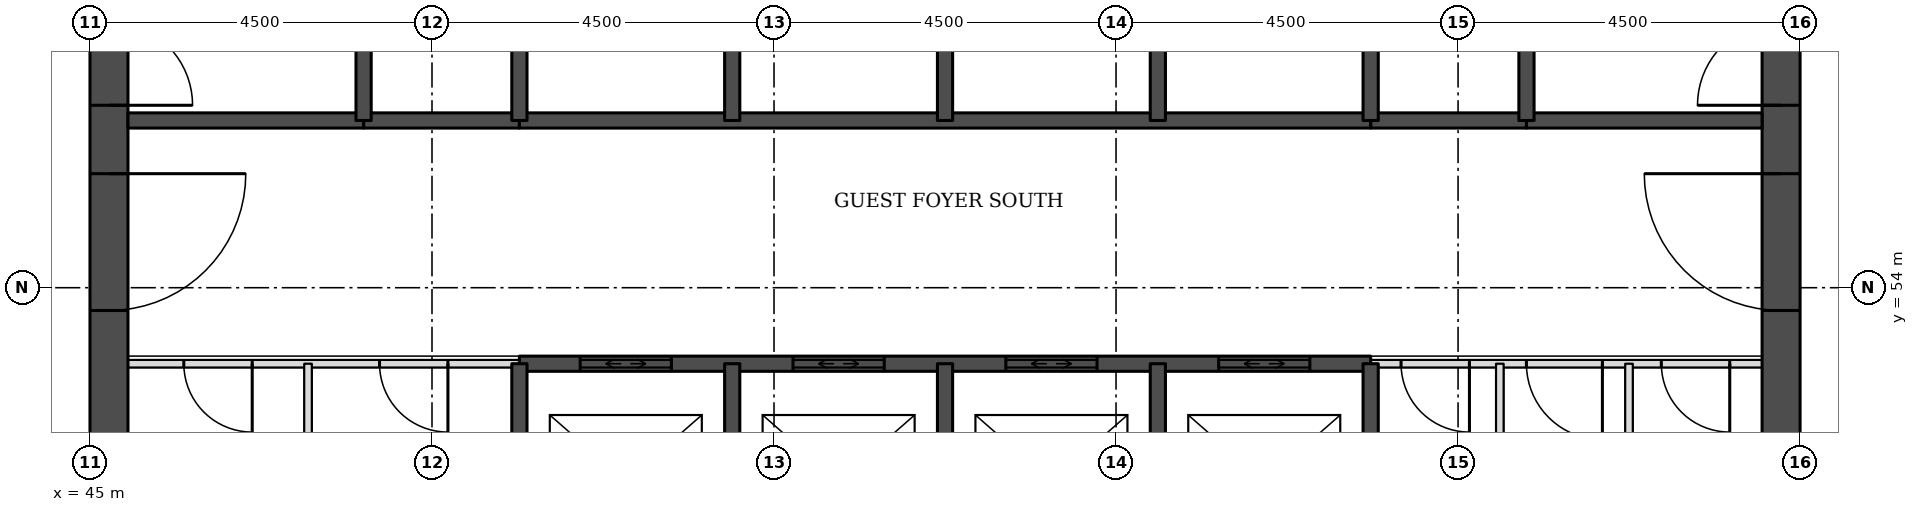
"""IFC4 building model, lengths in metres.
Left out: names, types, materials, properties, quantities, classifications, styles, units other than length and angle.
Written with IfcOpenShell. Run it as: python <this file> out.ifc"""

import sys

from ifc_helpers import new_model, si_unit, direction, frame, frame_2d, origin, place, context, subcontext, project, spatial, rectangle, extrude, element, fill, save


model = new_model("IFC4")
c1 = context("Model", 3, precision=1e-05, world=origin(), true_north=direction((0.0, 1.0)))
c2 = subcontext(c1, "Body", "Model", "MODEL_VIEW")
j1 = project(units=[si_unit("LENGTHUNIT", "METRE"), si_unit("PLANEANGLEUNIT", "RADIAN")], contexts=[c1])
p1 = place(None, origin())
s1 = spatial("IfcSite", under=j1, at=p1, CompositionType="ELEMENT")
p2 = place(p1, origin())
s2 = spatial("IfcBuilding", under=s1, at=p2, CompositionType="ELEMENT")
p3 = place(p2, frame((0.0, 0.0, 26.4)))
s3 = spatial("IfcBuildingStorey", under=s2, at=p3, CompositionType="ELEMENT", Elevation=26.4)
p4 = place(p3, frame((45.25, 49.5, 0.0), z_axis=(0.0, 0.0, 1.0), x_axis=(0.0, 1.0, 0.0)))
e1 = element("IfcWall", 1, at=p4, inside=s3, PredefinedType="SHEAR", context=c2, shape_type="SweptSolid", body=[
    extrude(rectangle(XDim=22.5, YDim=0.5, at=frame_2d((11.25, 0.0))), origin(), (0.0, 0.0, 1.0), 3.3),
])
p5 = place(p4, frame((4.2, 0.0, 0.0)))
e2 = element("IfcOpeningElement", 2, at=p5, cuts=e1, PredefinedType="OPENING", context=c2, shape_type="SweptSolid", body=[
    extrude(rectangle(XDim=1.8, YDim=2.1, at=frame_2d((0.9, 1.05))), frame((0.0, 0.26, 0.0), z_axis=(0.0, -1.0, 0.0), x_axis=(1.0, 0.0, 0.0)), (0.0, 0.0, 1.0), 0.52),
])
p6 = place(p4, frame((6.9, 0.0, 0.0)))
e3 = element("IfcOpeningElement", 3, at=p6, cuts=e1, PredefinedType="OPENING", context=c2, shape_type="SweptSolid", body=[
    extrude(rectangle(XDim=1.1, YDim=2.1, at=frame_2d((0.55, 1.05))), frame((0.0, 0.26, 0.0), z_axis=(0.0, -1.0, 0.0), x_axis=(1.0, 0.0, 0.0)), (0.0, 0.0, 1.0), 0.52),
])
p7 = place(p4, frame((13.6, 0.0, 0.0)))
e4 = element("IfcOpeningElement", 4, at=p7, cuts=e1, PredefinedType="OPENING", context=c2, shape_type="SweptSolid", body=[
    extrude(rectangle(XDim=1.1, YDim=2.1, at=frame_2d((0.55, 1.05))), frame((0.0, 0.26, 0.0), z_axis=(0.0, -1.0, 0.0), x_axis=(1.0, 0.0, 0.0)), (0.0, 0.0, 1.0), 0.52),
])
p8 = place(p4, frame((16.5, 0.0, 0.0)))
e5 = element("IfcOpeningElement", 5, at=p8, cuts=e1, PredefinedType="OPENING", context=c2, shape_type="SweptSolid", body=[
    extrude(rectangle(XDim=1.8, YDim=2.1, at=frame_2d((0.9, 1.05))), frame((0.0, 0.26, 0.0), z_axis=(0.0, -1.0, 0.0), x_axis=(1.0, 0.0, 0.0)), (0.0, 0.0, 1.0), 0.52),
])
p9 = place(p3, frame((67.25, 49.5, 0.0), z_axis=(0.0, 0.0, 1.0), x_axis=(0.0, 1.0, 0.0)))
e6 = element("IfcWall", 6, at=p9, inside=s3, PredefinedType="SHEAR", context=c2, shape_type="SweptSolid", body=[
    extrude(rectangle(XDim=22.5, YDim=0.5, at=frame_2d((11.25, 0.0))), origin(), (0.0, 0.0, 1.0), 3.3),
])
p10 = place(p9, frame((4.2, 0.0, 0.0)))
e7 = element("IfcOpeningElement", 7, at=p10, cuts=e6, PredefinedType="OPENING", context=c2, shape_type="SweptSolid", body=[
    extrude(rectangle(XDim=1.8, YDim=2.1, at=frame_2d((0.9, 1.05))), frame((0.0, 0.26, 0.0), z_axis=(0.0, -1.0, 0.0), x_axis=(1.0, 0.0, 0.0)), (0.0, 0.0, 1.0), 0.52),
])
p11 = place(p9, frame((6.9, 0.0, 0.0)))
e8 = element("IfcOpeningElement", 8, at=p11, cuts=e6, PredefinedType="OPENING", context=c2, shape_type="SweptSolid", body=[
    extrude(rectangle(XDim=1.1, YDim=2.1, at=frame_2d((0.55, 1.05))), frame((0.0, 0.26, 0.0), z_axis=(0.0, -1.0, 0.0), x_axis=(1.0, 0.0, 0.0)), (0.0, 0.0, 1.0), 0.52),
])
p12 = place(p9, frame((13.6, 0.0, 0.0)))
e9 = element("IfcOpeningElement", 9, at=p12, cuts=e6, PredefinedType="OPENING", context=c2, shape_type="SweptSolid", body=[
    extrude(rectangle(XDim=1.1, YDim=2.1, at=frame_2d((0.55, 1.05))), frame((0.0, 0.26, 0.0), z_axis=(0.0, -1.0, 0.0), x_axis=(1.0, 0.0, 0.0)), (0.0, 0.0, 1.0), 0.52),
])
p13 = place(p9, frame((16.5, 0.0, 0.0)))
e10 = element("IfcOpeningElement", 10, at=p13, cuts=e6, PredefinedType="OPENING", context=c2, shape_type="SweptSolid", body=[
    extrude(rectangle(XDim=1.8, YDim=2.1, at=frame_2d((0.9, 1.05))), frame((0.0, 0.26, 0.0), z_axis=(0.0, -1.0, 0.0), x_axis=(1.0, 0.0, 0.0)), (0.0, 0.0, 1.0), 0.52),
])
p14 = place(p3, frame((45.5, 53.0, 0.0), z_axis=(0.0, 0.0, 1.0), x_axis=(1.0, 0.0, 0.0)))
e11 = element("IfcWall", 11, at=p14, inside=s3, PredefinedType="PARTITIONING", context=c2, shape_type="SweptSolid", body=[
    extrude(rectangle(XDim=5.15, YDim=0.1, at=frame_2d((2.575, 0.0))), origin(), (0.0, 0.0, 1.0), 3.08),
])
p15 = place(p14, frame((0.735, 0.0, 0.0)))
e12 = element("IfcOpeningElement", 12, at=p15, cuts=e11, PredefinedType="OPENING", context=c2, shape_type="SweptSolid", body=[
    extrude(rectangle(XDim=0.9, YDim=2.1, at=frame_2d((0.45, 1.05))), frame((0.0, 0.06, 0.0), z_axis=(0.0, -1.0, 0.0), x_axis=(1.0, 0.0, 0.0)), (0.0, 0.0, 1.0), 0.12),
])
p16 = place(p14, frame((3.31, 0.0, 0.0)))
e13 = element("IfcOpeningElement", 13, at=p16, cuts=e11, PredefinedType="OPENING", context=c2, shape_type="SweptSolid", body=[
    extrude(rectangle(XDim=0.9, YDim=2.1, at=frame_2d((0.45, 1.05))), frame((0.0, 0.06, 0.0), z_axis=(0.0, -1.0, 0.0), x_axis=(1.0, 0.0, 0.0)), (0.0, 0.0, 1.0), 0.12),
])
p17 = place(p3, frame((61.85, 53.0, 0.0), z_axis=(0.0, 0.0, 1.0), x_axis=(1.0, 0.0, 0.0)))
e14 = element("IfcWall", 14, at=p17, inside=s3, PredefinedType="PARTITIONING", context=c2, shape_type="SweptSolid", body=[
    extrude(rectangle(XDim=5.15, YDim=0.1, at=frame_2d((2.575, 0.0))), origin(), (0.0, 0.0, 1.0), 3.08),
])
p18 = place(p17, frame((3.824, 0.0, 0.0)))
e15 = element("IfcOpeningElement", 15, at=p18, cuts=e14, PredefinedType="OPENING", context=c2, shape_type="SweptSolid", body=[
    extrude(rectangle(XDim=0.9, YDim=2.1, at=frame_2d((0.45, 1.05))), frame((0.0, 0.06, 0.0), z_axis=(0.0, -1.0, 0.0), x_axis=(1.0, 0.0, 0.0)), (0.0, 0.0, 1.0), 0.12),
])
p19 = place(p17, frame((2.049, 0.0, 0.0)))
e16 = element("IfcOpeningElement", 16, at=p19, cuts=e14, PredefinedType="OPENING", context=c2, shape_type="SweptSolid", body=[
    extrude(rectangle(XDim=1.0, YDim=2.1, at=frame_2d((0.5, 1.05))), frame((0.0, 0.06, 0.0), z_axis=(0.0, -1.0, 0.0), x_axis=(1.0, 0.0, 0.0)), (0.0, 0.0, 1.0), 0.12),
])
p20 = place(p17, frame((0.4, 0.0, 0.0)))
e17 = element("IfcOpeningElement", 17, at=p20, cuts=e14, PredefinedType="OPENING", context=c2, shape_type="SweptSolid", body=[
    extrude(rectangle(XDim=0.9, YDim=2.1, at=frame_2d((0.45, 1.05))), frame((0.0, 0.06, 0.0), z_axis=(0.0, -1.0, 0.0), x_axis=(1.0, 0.0, 0.0)), (0.0, 0.0, 1.0), 0.12),
])
p21 = place(p3, frame((50.65, 53.0, 0.0), z_axis=(0.0, 0.0, 1.0), x_axis=(1.0, 0.0, 0.0)))
e18 = element("IfcWall", 18, at=p21, inside=s3, PredefinedType="SOLIDWALL", context=c2, shape_type="SweptSolid", body=[
    extrude(rectangle(XDim=11.2, YDim=0.2, at=frame_2d((5.6, 0.0))), origin(), (0.0, 0.0, 1.0), 3.08),
])
p22 = place(p21, frame((0.8, 0.0, 0.0)))
e19 = element("IfcOpeningElement", 19, at=p22, cuts=e18, PredefinedType="OPENING", context=c2, shape_type="SweptSolid", body=[
    extrude(rectangle(XDim=1.2, YDim=2.1, at=frame_2d((0.6, 1.05))), frame((0.0, 0.11, 0.0), z_axis=(0.0, -1.0, 0.0), x_axis=(1.0, 0.0, 0.0)), (0.0, 0.0, 1.0), 0.22),
])
p23 = place(p21, frame((3.6, 0.0, 0.0)))
e20 = element("IfcOpeningElement", 20, at=p23, cuts=e18, PredefinedType="OPENING", context=c2, shape_type="SweptSolid", body=[
    extrude(rectangle(XDim=1.2, YDim=2.1, at=frame_2d((0.6, 1.05))), frame((0.0, 0.11, 0.0), z_axis=(0.0, -1.0, 0.0), x_axis=(1.0, 0.0, 0.0)), (0.0, 0.0, 1.0), 0.22),
])
p24 = place(p21, frame((6.4, 0.0, 0.0)))
e21 = element("IfcOpeningElement", 21, at=p24, cuts=e18, PredefinedType="OPENING", context=c2, shape_type="SweptSolid", body=[
    extrude(rectangle(XDim=1.2, YDim=2.1, at=frame_2d((0.6, 1.05))), frame((0.0, 0.11, 0.0), z_axis=(0.0, -1.0, 0.0), x_axis=(1.0, 0.0, 0.0)), (0.0, 0.0, 1.0), 0.22),
])
p25 = place(p21, frame((9.2, 0.0, 0.0)))
e22 = element("IfcOpeningElement", 22, at=p25, cuts=e18, PredefinedType="OPENING", context=c2, shape_type="SweptSolid", body=[
    extrude(rectangle(XDim=1.2, YDim=2.1, at=frame_2d((0.6, 1.05))), frame((0.0, 0.11, 0.0), z_axis=(0.0, -1.0, 0.0), x_axis=(1.0, 0.0, 0.0)), (0.0, 0.0, 1.0), 0.22),
])
for number, where, z_axis, x_axis in (
    (23, (48.6, 56.2, 0.0), (0.0, 0.0, 1.0), (1.0, 0.0, 0.0)),
    (24, (61.85, 56.2, 0.0), (0.0, 0.0, 1.0), (1.0, 0.0, 0.0)),
):
    element("IfcWall", number, at=place(p3, frame(where, z_axis=z_axis, x_axis=x_axis)), inside=s3, PredefinedType="SOLIDWALL", context=c2, shape_type="SweptSolid", body=[
        extrude(rectangle(XDim=2.05, YDim=0.2, at=frame_2d((1.025, 0.0))), origin(), (0.0, 0.0, 1.0), 3.08),
    ])
p26 = place(p3, frame((45.5, 56.2, 0.0), z_axis=(0.0, 0.0, 1.0), x_axis=(1.0, 0.0, 0.0)))
e25 = element("IfcWall", 25, at=p26, inside=s3, PredefinedType="SOLIDWALL", context=c2, shape_type="SweptSolid", body=[
    extrude(rectangle(XDim=3.1, YDim=0.2, at=frame_2d((1.55, 0.0))), origin(), (0.0, 0.0, 1.0), 3.08),
])
p27 = place(p3, frame((50.65, 56.2, 0.0), z_axis=(0.0, 0.0, 1.0), x_axis=(1.0, 0.0, 0.0)))
e26 = element("IfcWall", 26, at=p27, inside=s3, PredefinedType="SOLIDWALL", context=c2, shape_type="SweptSolid", body=[
    extrude(rectangle(XDim=11.2, YDim=0.2, at=frame_2d((5.6, 0.0))), origin(), (0.0, 0.0, 1.0), 3.08),
])
p28 = place(p3, frame((63.9, 56.2, 0.0), z_axis=(0.0, 0.0, 1.0), x_axis=(1.0, 0.0, 0.0)))
e27 = element("IfcWall", 27, at=p28, inside=s3, PredefinedType="SOLIDWALL", context=c2, shape_type="SweptSolid", body=[
    extrude(rectangle(XDim=3.1, YDim=0.2, at=frame_2d((1.55, 0.0))), origin(), (0.0, 0.0, 1.0), 3.08),
])
p29 = place(p3, frame((47.869, 50.0, 0.0), z_axis=(0.0, 0.0, 1.0), x_axis=(0.0, 1.0, 0.0)))
e28 = element("IfcWall", 28, at=p29, inside=s3, PredefinedType="PARTITIONING", context=c2, shape_type="SweptSolid", body=[
    extrude(rectangle(XDim=3.0, YDim=0.1, at=frame_2d((1.5, 0.0))), origin(), (0.0, 0.0, 1.0), 3.08),
])
p30 = place(p3, frame((48.6, 56.2, 0.0), z_axis=(0.0, 0.0, 1.0), x_axis=(0.0, 1.0, 0.0)))
e29 = element("IfcWall", 29, at=p30, inside=s3, PredefinedType="SOLIDWALL", context=c2, shape_type="SweptSolid", body=[
    extrude(rectangle(XDim=5.8, YDim=0.2, at=frame_2d((2.9, 0.0))), origin(), (0.0, 0.0, 1.0), 3.08),
])
p31 = place(p3, frame((50.65, 50.0, 0.0), z_axis=(0.0, 0.0, 1.0), x_axis=(0.0, 1.0, 0.0)))
e30 = element("IfcWall", 30, at=p31, inside=s3, PredefinedType="SOLIDWALL", context=c2, shape_type="SweptSolid", body=[
    extrude(rectangle(XDim=3.0, YDim=0.2, at=frame_2d((1.5, 0.0))), origin(), (0.0, 0.0, 1.0), 3.08),
])
p32 = place(p3, frame((50.65, 56.2, 0.0), z_axis=(0.0, 0.0, 1.0), x_axis=(0.0, 1.0, 0.0)))
e31 = element("IfcWall", 31, at=p32, inside=s3, PredefinedType="SOLIDWALL", context=c2, shape_type="SweptSolid", body=[
    extrude(rectangle(XDim=2.8, YDim=0.2, at=frame_2d((1.4, 0.0))), origin(), (0.0, 0.0, 1.0), 3.08),
])
p33 = place(p3, frame((53.45, 50.0, 0.0), z_axis=(0.0, 0.0, 1.0), x_axis=(0.0, 1.0, 0.0)))
e32 = element("IfcWall", 32, at=p33, inside=s3, PredefinedType="SOLIDWALL", context=c2, shape_type="SweptSolid", body=[
    extrude(rectangle(XDim=3.0, YDim=0.2, at=frame_2d((1.5, 0.0))), origin(), (0.0, 0.0, 1.0), 3.08),
])
p34 = place(p3, frame((53.45, 56.2, 0.0), z_axis=(0.0, 0.0, 1.0), x_axis=(0.0, 1.0, 0.0)))
e33 = element("IfcWall", 33, at=p34, inside=s3, PredefinedType="SOLIDWALL", context=c2, shape_type="SweptSolid", body=[
    extrude(rectangle(XDim=2.8, YDim=0.2, at=frame_2d((1.4, 0.0))), origin(), (0.0, 0.0, 1.0), 3.08),
])
p35 = place(p3, frame((56.25, 50.0, 0.0), z_axis=(0.0, 0.0, 1.0), x_axis=(0.0, 1.0, 0.0)))
e34 = element("IfcWall", 34, at=p35, inside=s3, PredefinedType="SOLIDWALL", context=c2, shape_type="SweptSolid", body=[
    extrude(rectangle(XDim=3.0, YDim=0.2, at=frame_2d((1.5, 0.0))), origin(), (0.0, 0.0, 1.0), 3.08),
])
p36 = place(p3, frame((56.25, 56.2, 0.0), z_axis=(0.0, 0.0, 1.0), x_axis=(0.0, 1.0, 0.0)))
e35 = element("IfcWall", 35, at=p36, inside=s3, PredefinedType="SOLIDWALL", context=c2, shape_type="SweptSolid", body=[
    extrude(rectangle(XDim=2.8, YDim=0.2, at=frame_2d((1.4, 0.0))), origin(), (0.0, 0.0, 1.0), 3.08),
])
p37 = place(p3, frame((59.05, 50.0, 0.0), z_axis=(0.0, 0.0, 1.0), x_axis=(0.0, 1.0, 0.0)))
e36 = element("IfcWall", 36, at=p37, inside=s3, PredefinedType="SOLIDWALL", context=c2, shape_type="SweptSolid", body=[
    extrude(rectangle(XDim=3.0, YDim=0.2, at=frame_2d((1.5, 0.0))), origin(), (0.0, 0.0, 1.0), 3.08),
])
p38 = place(p3, frame((59.05, 56.2, 0.0), z_axis=(0.0, 0.0, 1.0), x_axis=(0.0, 1.0, 0.0)))
e37 = element("IfcWall", 37, at=p38, inside=s3, PredefinedType="SOLIDWALL", context=c2, shape_type="SweptSolid", body=[
    extrude(rectangle(XDim=2.8, YDim=0.2, at=frame_2d((1.4, 0.0))), origin(), (0.0, 0.0, 1.0), 3.08),
])
p39 = place(p3, frame((61.85, 50.0, 0.0), z_axis=(0.0, 0.0, 1.0), x_axis=(0.0, 1.0, 0.0)))
e38 = element("IfcWall", 38, at=p39, inside=s3, PredefinedType="SOLIDWALL", context=c2, shape_type="SweptSolid", body=[
    extrude(rectangle(XDim=3.0, YDim=0.2, at=frame_2d((1.5, 0.0))), origin(), (0.0, 0.0, 1.0), 3.08),
])
p40 = place(p3, frame((61.85, 56.2, 0.0), z_axis=(0.0, 0.0, 1.0), x_axis=(0.0, 1.0, 0.0)))
e39 = element("IfcWall", 39, at=p40, inside=s3, PredefinedType="SOLIDWALL", context=c2, shape_type="SweptSolid", body=[
    extrude(rectangle(XDim=2.8, YDim=0.2, at=frame_2d((1.4, 0.0))), origin(), (0.0, 0.0, 1.0), 3.08),
])
p41 = place(p3, frame((63.55, 50.0, 0.0), z_axis=(0.0, 0.0, 1.0), x_axis=(0.0, 1.0, 0.0)))
e40 = element("IfcWall", 40, at=p41, inside=s3, PredefinedType="PARTITIONING", context=c2, shape_type="SweptSolid", body=[
    extrude(rectangle(XDim=3.0, YDim=0.1, at=frame_2d((1.5, 0.0))), origin(), (0.0, 0.0, 1.0), 3.08),
])
p42 = place(p3, frame((63.9, 56.2, 0.0), z_axis=(0.0, 0.0, 1.0), x_axis=(0.0, 1.0, 0.0)))
e41 = element("IfcWall", 41, at=p42, inside=s3, PredefinedType="SOLIDWALL", context=c2, shape_type="SweptSolid", body=[
    extrude(rectangle(XDim=5.8, YDim=0.2, at=frame_2d((2.9, 0.0))), origin(), (0.0, 0.0, 1.0), 3.08),
])
p43 = place(p3, frame((65.249, 50.0, 0.0), z_axis=(0.0, 0.0, 1.0), x_axis=(0.0, 1.0, 0.0)))
e42 = element("IfcWall", 42, at=p43, inside=s3, PredefinedType="PARTITIONING", context=c2, shape_type="SweptSolid", body=[
    extrude(rectangle(XDim=3.0, YDim=0.1, at=frame_2d((1.5, 0.0))), origin(), (0.0, 0.0, 1.0), 3.08),
])
p44 = place(p22, origin())
e43 = element("IfcDoor", 43, at=p44, inside=s3, OperationType="DOUBLE_DOOR_SLIDING", PredefinedType="DOOR", context=c2, shape_type="SweptSolid", body=[
    extrude(rectangle(XDim=1.2, YDim=2.1, at=frame_2d((0.6, 1.05))), frame((0.0, 0.025, 0.0), z_axis=(0.0, -1.0, 0.0), x_axis=(1.0, 0.0, 0.0)), (0.0, 0.0, 1.0), 0.05),
])
fill(e19, e43)
p45 = place(p23, origin())
e44 = element("IfcDoor", 44, at=p45, inside=s3, OperationType="DOUBLE_DOOR_SLIDING", PredefinedType="DOOR", context=c2, shape_type="SweptSolid", body=[
    extrude(rectangle(XDim=1.2, YDim=2.1, at=frame_2d((0.6, 1.05))), frame((0.0, 0.025, 0.0), z_axis=(0.0, -1.0, 0.0), x_axis=(1.0, 0.0, 0.0)), (0.0, 0.0, 1.0), 0.05),
])
fill(e20, e44)
p46 = place(p24, origin())
e45 = element("IfcDoor", 45, at=p46, inside=s3, OperationType="DOUBLE_DOOR_SLIDING", PredefinedType="DOOR", context=c2, shape_type="SweptSolid", body=[
    extrude(rectangle(XDim=1.2, YDim=2.1, at=frame_2d((0.6, 1.05))), frame((0.0, 0.025, 0.0), z_axis=(0.0, -1.0, 0.0), x_axis=(1.0, 0.0, 0.0)), (0.0, 0.0, 1.0), 0.05),
])
fill(e21, e45)
p47 = place(p25, origin())
e46 = element("IfcDoor", 46, at=p47, inside=s3, OperationType="DOUBLE_DOOR_SLIDING", PredefinedType="DOOR", context=c2, shape_type="SweptSolid", body=[
    extrude(rectangle(XDim=1.2, YDim=2.1, at=frame_2d((0.6, 1.05))), frame((0.0, 0.025, 0.0), z_axis=(0.0, -1.0, 0.0), x_axis=(1.0, 0.0, 0.0)), (0.0, 0.0, 1.0), 0.05),
])
fill(e22, e46)
p48 = place(p5, frame((1.8, 0.0, 0.0), z_axis=(0.0, 0.0, 1.0), x_axis=(-1.0, 0.0, 0.0)))
e47 = element("IfcDoor", 47, at=p48, inside=s3, OperationType="SINGLE_SWING_LEFT", PredefinedType="DOOR", context=c2, shape_type="SweptSolid", body=[
    extrude(rectangle(XDim=1.8, YDim=2.1, at=frame_2d((0.9, 1.05))), frame((0.0, 0.025, 0.0), z_axis=(0.0, -1.0, 0.0), x_axis=(1.0, 0.0, 0.0)), (0.0, 0.0, 1.0), 0.05),
])
fill(e2, e47)
p49 = place(p6, frame((1.1, 0.0, 0.0), z_axis=(0.0, 0.0, 1.0), x_axis=(-1.0, 0.0, 0.0)))
e48 = element("IfcDoor", 48, at=p49, inside=s3, OperationType="SINGLE_SWING_RIGHT", PredefinedType="DOOR", context=c2, shape_type="SweptSolid", body=[
    extrude(rectangle(XDim=1.1, YDim=2.1, at=frame_2d((0.55, 1.05))), frame((0.0, 0.025, 0.0), z_axis=(0.0, -1.0, 0.0), x_axis=(1.0, 0.0, 0.0)), (0.0, 0.0, 1.0), 0.05),
])
fill(e3, e48)
p50 = place(p10, origin())
e49 = element("IfcDoor", 49, at=p50, inside=s3, OperationType="SINGLE_SWING_RIGHT", PredefinedType="DOOR", context=c2, shape_type="SweptSolid", body=[
    extrude(rectangle(XDim=1.8, YDim=2.1, at=frame_2d((0.9, 1.05))), frame((0.0, 0.025, 0.0), z_axis=(0.0, -1.0, 0.0), x_axis=(1.0, 0.0, 0.0)), (0.0, 0.0, 1.0), 0.05),
])
fill(e7, e49)
p51 = place(p11, origin())
e50 = element("IfcDoor", 50, at=p51, inside=s3, OperationType="SINGLE_SWING_LEFT", PredefinedType="DOOR", context=c2, shape_type="SweptSolid", body=[
    extrude(rectangle(XDim=1.1, YDim=2.1, at=frame_2d((0.55, 1.05))), frame((0.0, 0.025, 0.0), z_axis=(0.0, -1.0, 0.0), x_axis=(1.0, 0.0, 0.0)), (0.0, 0.0, 1.0), 0.05),
])
fill(e8, e50)
p52 = place(p18, frame((0.9, 0.0, 0.0), z_axis=(0.0, 0.0, 1.0), x_axis=(-1.0, 0.0, 0.0)))
e51 = element("IfcDoor", 51, at=p52, inside=s3, OperationType="SINGLE_SWING_LEFT", PredefinedType="DOOR", context=c2, shape_type="SweptSolid", body=[
    extrude(rectangle(XDim=0.9, YDim=2.1, at=frame_2d((0.45, 1.05))), frame((0.0, 0.025, 0.0), z_axis=(0.0, -1.0, 0.0), x_axis=(1.0, 0.0, 0.0)), (0.0, 0.0, 1.0), 0.05),
])
fill(e15, e51)
p53 = place(p19, frame((1.0, 0.0, 0.0), z_axis=(0.0, 0.0, 1.0), x_axis=(-1.0, 0.0, 0.0)))
e52 = element("IfcDoor", 52, at=p53, inside=s3, OperationType="SINGLE_SWING_LEFT", PredefinedType="DOOR", context=c2, shape_type="SweptSolid", body=[
    extrude(rectangle(XDim=1.0, YDim=2.1, at=frame_2d((0.5, 1.05))), frame((0.0, 0.025, 0.0), z_axis=(0.0, -1.0, 0.0), x_axis=(1.0, 0.0, 0.0)), (0.0, 0.0, 1.0), 0.05),
])
fill(e16, e52)
p54 = place(p20, frame((0.9, 0.0, 0.0), z_axis=(0.0, 0.0, 1.0), x_axis=(-1.0, 0.0, 0.0)))
e53 = element("IfcDoor", 53, at=p54, inside=s3, OperationType="SINGLE_SWING_LEFT", PredefinedType="DOOR", context=c2, shape_type="SweptSolid", body=[
    extrude(rectangle(XDim=0.9, YDim=2.1, at=frame_2d((0.45, 1.05))), frame((0.0, 0.025, 0.0), z_axis=(0.0, -1.0, 0.0), x_axis=(1.0, 0.0, 0.0)), (0.0, 0.0, 1.0), 0.05),
])
fill(e17, e53)
p55 = place(p15, frame((0.9, 0.0, 0.0), z_axis=(0.0, 0.0, 1.0), x_axis=(-1.0, 0.0, 0.0)))
e54 = element("IfcDoor", 54, at=p55, inside=s3, OperationType="SINGLE_SWING_LEFT", PredefinedType="DOOR", context=c2, shape_type="SweptSolid", body=[
    extrude(rectangle(XDim=0.9, YDim=2.1, at=frame_2d((0.45, 1.05))), frame((0.0, 0.025, 0.0), z_axis=(0.0, -1.0, 0.0), x_axis=(1.0, 0.0, 0.0)), (0.0, 0.0, 1.0), 0.05),
])
fill(e12, e54)
p56 = place(p16, frame((0.9, 0.0, 0.0), z_axis=(0.0, 0.0, 1.0), x_axis=(-1.0, 0.0, 0.0)))
e55 = element("IfcDoor", 55, at=p56, inside=s3, OperationType="SINGLE_SWING_LEFT", PredefinedType="DOOR", context=c2, shape_type="SweptSolid", body=[
    extrude(rectangle(XDim=0.9, YDim=2.1, at=frame_2d((0.45, 1.05))), frame((0.0, 0.025, 0.0), z_axis=(0.0, -1.0, 0.0), x_axis=(1.0, 0.0, 0.0)), (0.0, 0.0, 1.0), 0.05),
])
fill(e13, e55)
save(model, sys.argv[1])
